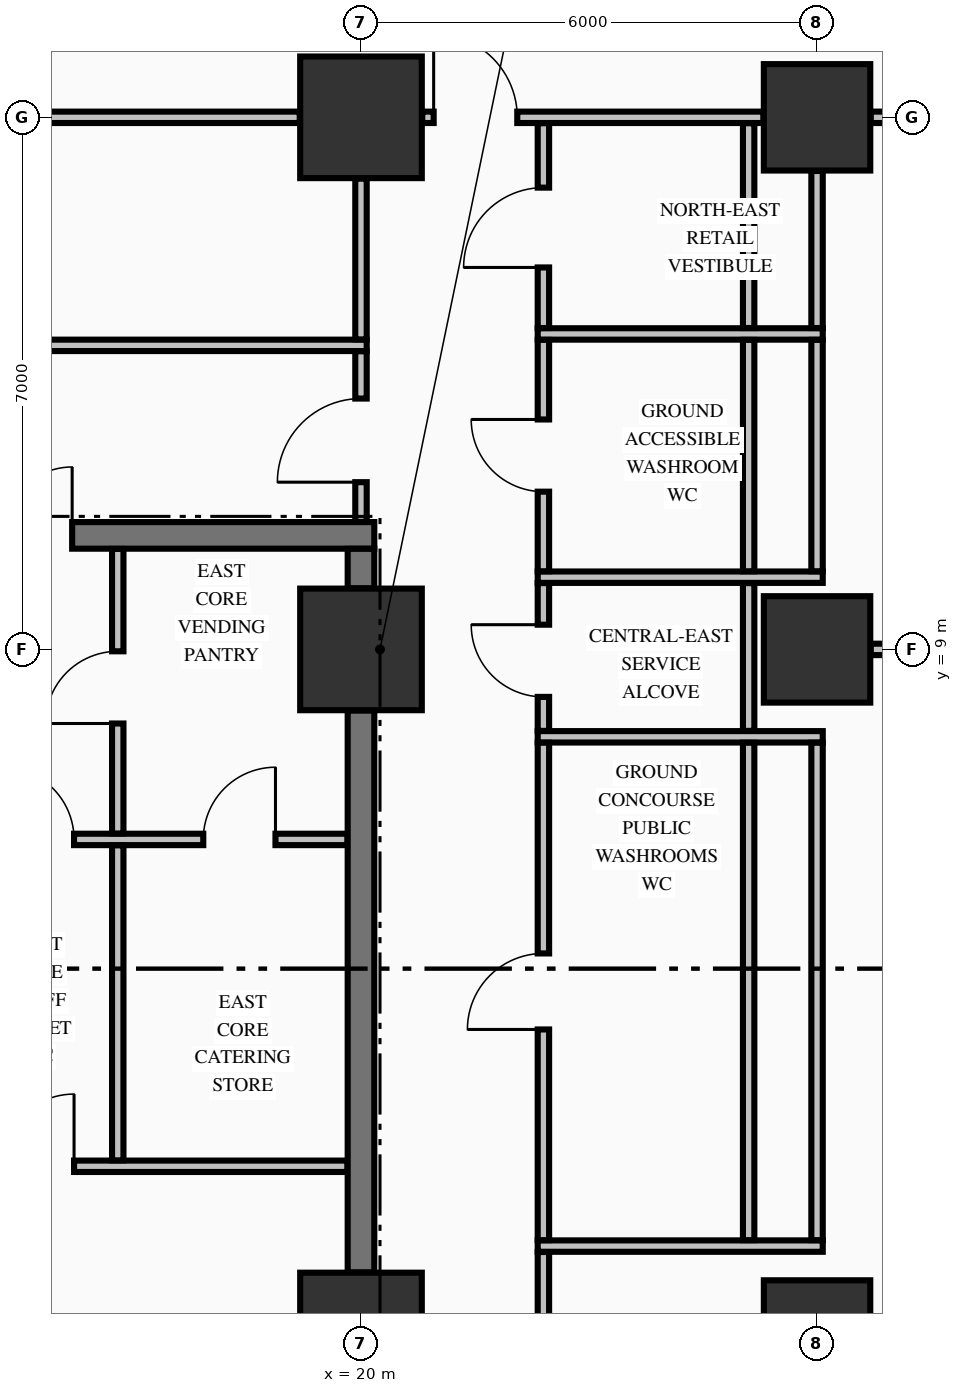
"""IFC4 building model, lengths in metres.
Left out: names, types, materials, properties, quantities, classifications, styles, units other than length and angle.
Written with IfcOpenShell. Run it as: python <this file> out.ifc"""

import sys

from ifc_helpers import new_model, si_unit, direction, frame, frame_2d, origin, origin_2d, place, context, subcontext, project, spatial, rectangle, extrude, element, fill, save


model = new_model("IFC4")
c1 = context("Model", 3, precision=1e-05, world=origin(), true_north=direction((0.0, 1.0)))
c2 = subcontext(c1, "Body", "Model", "MODEL_VIEW")
j1 = project(units=[si_unit("LENGTHUNIT", "METRE"), si_unit("PLANEANGLEUNIT", "RADIAN")], contexts=[c1])
p1 = place(None, origin())
s1 = spatial("IfcSite", under=j1, at=p1, CompositionType="ELEMENT")
p2 = place(p1, origin())
s2 = spatial("IfcBuilding", under=s1, at=p2, CompositionType="ELEMENT")
p3 = place(p2, origin())
s3 = spatial("IfcBuildingStorey", under=s2, at=p3, CompositionType="ELEMENT", Elevation=0.0)
for number, where, z_axis, x_axis in (
    (1, (20.0, 0.0, 0.0), (0.0, 0.0, 1.0), (1.0, 0.0, 0.0)),
    (2, (20.0, 9.0, 0.0), (0.0, 0.0, 1.0), (1.0, 0.0, 0.0)),
    (3, (20.0, 16.0, 0.0), (0.0, 0.0, 1.0), (1.0, 0.0, 0.0)),
):
    element("IfcColumn", number, at=place(p3, frame(where, z_axis=z_axis, x_axis=x_axis)), inside=s3, PredefinedType="COLUMN", context=c2, shape_type="SweptSolid", body=[
        extrude(rectangle(XDim=1.6, YDim=1.6, at=origin_2d()), origin(), (0.0, 0.0, 1.0), 5.09),
    ])
for number, where, z_axis, x_axis in (
    (4, (26.0, 0.0, 0.0), (0.0, 0.0, 1.0), (1.0, 0.0, 0.0)),
    (5, (26.0, 9.0, 0.0), (0.0, 0.0, 1.0), (1.0, 0.0, 0.0)),
    (6, (26.0, 16.0, 0.0), (0.0, 0.0, 1.0), (1.0, 0.0, 0.0)),
):
    element("IfcColumn", number, at=place(p3, frame(where, z_axis=z_axis, x_axis=x_axis)), inside=s3, PredefinedType="COLUMN", context=c2, shape_type="SweptSolid", body=[
        extrude(rectangle(XDim=1.4, YDim=1.4, at=origin_2d()), origin(), (0.0, 0.0, 1.0), 5.09),
    ])
p4 = place(p3, frame((14.7, 10.5, 0.0), z_axis=(0.0, 0.0, 1.0), x_axis=(1.0, 0.0, 0.0)))
e7 = element("IfcWall", 7, at=p4, inside=s3, PredefinedType="SHEAR", context=c2, shape_type="SweptSolid", body=[
    extrude(rectangle(XDim=5.475, YDim=0.35, at=frame_2d((2.738, 0.0))), origin(), (0.0, 0.0, 1.0), 5.09),
])
p5 = place(p4, frame((0.6, 0.0, 0.0)))
e8 = element("IfcOpeningElement", 8, at=p5, cuts=e7, PredefinedType="OPENING", context=c2, shape_type="SweptSolid", body=[
    extrude(rectangle(XDim=0.9, YDim=2.15, at=frame_2d((0.45, 1.075))), frame((0.0, 0.185, 0.0), z_axis=(0.0, -1.0, 0.0), x_axis=(1.0, 0.0, 0.0)), (0.0, 0.0, 1.0), 0.37),
])
p6 = place(p3, frame((22.325, 1.15, 0.0), z_axis=(0.0, 0.0, 1.0), x_axis=(1.0, 0.0, 0.0)))
e9 = element("IfcWall", 9, at=p6, inside=s3, PredefinedType="PARTITIONING", context=c2, shape_type="SweptSolid", body=[
    extrude(rectangle(XDim=3.75, YDim=0.15, at=frame_2d((1.875, 0.0))), origin(), (0.0, 0.0, 1.0), 5.09),
])
p7 = place(p3, frame((14.878, 2.2, 0.0), z_axis=(0.0, 0.0, 1.0), x_axis=(1.0, 0.0, 0.0)))
e10 = element("IfcWall", 10, at=p7, inside=s3, PredefinedType="PARTITIONING", context=c2, shape_type="SweptSolid", body=[
    extrude(rectangle(XDim=4.944, YDim=0.15, at=frame_2d((2.472, 0.0))), origin(), (0.0, 0.0, 1.0), 5.09),
])
p8 = place(p7, frame((0.397, 0.0, 0.0)))
e11 = element("IfcOpeningElement", 11, at=p8, cuts=e10, PredefinedType="OPENING", context=c2, shape_type="SweptSolid", body=[
    extrude(rectangle(XDim=0.95, YDim=2.15, at=frame_2d((0.475, 1.075))), frame((0.0, 0.085, 0.0), z_axis=(0.0, -1.0, 0.0), x_axis=(1.0, 0.0, 0.0)), (0.0, 0.0, 1.0), 0.17),
])
p9 = place(p3, frame((14.878, 6.5, 0.0), z_axis=(0.0, 0.0, 1.0), x_axis=(1.0, 0.0, 0.0)))
e12 = element("IfcWall", 12, at=p9, inside=s3, PredefinedType="PARTITIONING", context=c2, shape_type="SweptSolid", body=[
    extrude(rectangle(XDim=4.944, YDim=0.15, at=frame_2d((2.472, 0.0))), origin(), (0.0, 0.0, 1.0), 5.09),
])
p10 = place(p9, frame((0.397, 0.0, 0.0)))
e13 = element("IfcOpeningElement", 13, at=p10, cuts=e12, PredefinedType="OPENING", context=c2, shape_type="SweptSolid", body=[
    extrude(rectangle(XDim=0.95, YDim=2.15, at=frame_2d((0.475, 1.075))), frame((0.0, 0.085, 0.0), z_axis=(0.0, -1.0, 0.0), x_axis=(1.0, 0.0, 0.0)), (0.0, 0.0, 1.0), 0.17),
])
p11 = place(p9, frame((3.047, 0.0, 0.0)))
e14 = element("IfcOpeningElement", 14, at=p11, cuts=e12, PredefinedType="OPENING", context=c2, shape_type="SweptSolid", body=[
    extrude(rectangle(XDim=0.95, YDim=2.15, at=frame_2d((0.475, 1.075))), frame((0.0, 0.085, 0.0), z_axis=(0.0, -1.0, 0.0), x_axis=(1.0, 0.0, 0.0)), (0.0, 0.0, 1.0), 0.17),
])
p12 = place(p3, frame((22.325, 7.85, 0.0), z_axis=(0.0, 0.0, 1.0), x_axis=(1.0, 0.0, 0.0)))
e15 = element("IfcWall", 15, at=p12, inside=s3, PredefinedType="PARTITIONING", context=c2, shape_type="SweptSolid", body=[
    extrude(rectangle(XDim=3.75, YDim=0.15, at=frame_2d((1.875, 0.0))), origin(), (0.0, 0.0, 1.0), 5.09),
])
p13 = place(p3, frame((26.706, 9.0, 0.0), z_axis=(0.0, 0.0, 1.0), x_axis=(1.0, 0.0, 0.0)))
e16 = element("IfcWall", 16, at=p13, inside=s3, PredefinedType="PARTITIONING", context=c2, shape_type="SweptSolid", body=[
    extrude(rectangle(XDim=2.588, YDim=0.15, at=frame_2d((1.294, 0.0))), origin(), (0.0, 0.0, 1.0), 4.132),
])
p14 = place(p13, frame((0.744, 0.0, 0.0)))
e17 = element("IfcOpeningElement", 17, at=p14, cuts=e16, PredefinedType="OPENING", context=c2, shape_type="SweptSolid", body=[
    extrude(rectangle(XDim=1.1, YDim=2.15, at=frame_2d((0.55, 1.075))), frame((0.0, 0.085, 0.0), z_axis=(0.0, -1.0, 0.0), x_axis=(1.0, 0.0, 0.0)), (0.0, 0.0, 1.0), 0.17),
])
p15 = place(p3, frame((22.325, 9.95, 0.0), z_axis=(0.0, 0.0, 1.0), x_axis=(1.0, 0.0, 0.0)))
e18 = element("IfcWall", 18, at=p15, inside=s3, PredefinedType="PARTITIONING", context=c2, shape_type="SweptSolid", body=[
    extrude(rectangle(XDim=3.75, YDim=0.15, at=frame_2d((1.875, 0.0))), origin(), (0.0, 0.0, 1.0), 5.09),
])
p16 = place(p3, frame((8.765, 13.0, 0.0), z_axis=(0.0, 0.0, 1.0), x_axis=(1.0, 0.0, 0.0)))
e19 = element("IfcWall", 19, at=p16, inside=s3, PredefinedType="PARTITIONING", context=c2, shape_type="SweptSolid", body=[
    extrude(rectangle(XDim=11.31, YDim=0.15, at=frame_2d((5.655, 0.0))), origin(), (0.0, 0.0, 1.0), 5.09),
])
p17 = place(p16, frame((0.485, 0.0, 0.0)))
e20 = element("IfcOpeningElement", 20, at=p17, cuts=e19, PredefinedType="OPENING", context=c2, shape_type="SweptSolid", body=[
    extrude(rectangle(XDim=1.1, YDim=2.15, at=frame_2d((0.55, 1.075))), frame((0.0, 0.085, 0.0), z_axis=(0.0, -1.0, 0.0), x_axis=(1.0, 0.0, 0.0)), (0.0, 0.0, 1.0), 0.17),
])
p18 = place(p3, frame((22.325, 13.15, 0.0), z_axis=(0.0, 0.0, 1.0), x_axis=(1.0, 0.0, 0.0)))
e21 = element("IfcWall", 21, at=p18, inside=s3, PredefinedType="PARTITIONING", context=c2, shape_type="SweptSolid", body=[
    extrude(rectangle(XDim=3.75, YDim=0.15, at=frame_2d((1.875, 0.0))), origin(), (0.0, 0.0, 1.0), 5.09),
])
p19 = place(p3, frame((11.806, 16.0, 0.0), z_axis=(0.0, 0.0, 1.0), x_axis=(1.0, 0.0, 0.0)))
e22 = element("IfcWall", 22, at=p19, inside=s3, PredefinedType="PARTITIONING", context=c2, shape_type="SweptSolid", body=[
    extrude(rectangle(XDim=7.388, YDim=0.15, at=frame_2d((3.694, 0.0))), origin(), (0.0, 0.0, 1.0), 4.132),
])
p20 = place(p3, frame((20.806, 16.0, 0.0), z_axis=(0.0, 0.0, 1.0), x_axis=(1.0, 0.0, 0.0)))
e23 = element("IfcWall", 23, at=p20, inside=s3, PredefinedType="PARTITIONING", context=c2, shape_type="SweptSolid", body=[
    extrude(rectangle(XDim=4.488, YDim=0.15, at=frame_2d((2.244, 0.0))), origin(), (0.0, 0.0, 1.0), 4.132),
])
p21 = place(p20, frame((0.15, 0.0, 0.0)))
e24 = element("IfcOpeningElement", 24, at=p21, cuts=e23, PredefinedType="OPENING", context=c2, shape_type="SweptSolid", body=[
    extrude(rectangle(XDim=1.1, YDim=2.15, at=frame_2d((0.55, 1.075))), frame((0.0, 0.085, 0.0), z_axis=(0.0, -1.0, 0.0), x_axis=(1.0, 0.0, 0.0)), (0.0, 0.0, 1.0), 0.17),
])
p22 = place(p3, frame((26.706, 16.0, 0.0), z_axis=(0.0, 0.0, 1.0), x_axis=(1.0, 0.0, 0.0)))
e25 = element("IfcWall", 25, at=p22, inside=s3, PredefinedType="PARTITIONING", context=c2, shape_type="SweptSolid", body=[
    extrude(rectangle(XDim=2.588, YDim=0.15, at=frame_2d((1.294, 0.0))), origin(), (0.0, 0.0, 1.0), 4.132),
])
p23 = place(p22, frame((0.819, 0.0, 0.0)))
e26 = element("IfcOpeningElement", 26, at=p23, cuts=e25, PredefinedType="OPENING", context=c2, shape_type="SweptSolid", body=[
    extrude(rectangle(XDim=0.95, YDim=2.15, at=frame_2d((0.475, 1.075))), frame((0.0, 0.085, 0.0), z_axis=(0.0, -1.0, 0.0), x_axis=(1.0, 0.0, 0.0)), (0.0, 0.0, 1.0), 0.17),
])
p24 = place(p3, frame((20.0, 0.804, 0.0), z_axis=(0.0, 0.0, 1.0), x_axis=(0.0, 1.0, 0.0)))
e27 = element("IfcWall", 27, at=p24, inside=s3, PredefinedType="SHEAR", context=c2, shape_type="SweptSolid", body=[
    extrude(rectangle(XDim=7.392, YDim=0.35, at=frame_2d((3.696, 0.0))), origin(), (0.0, 0.0, 1.0), 5.09),
])
p25 = place(p3, frame((20.0, 9.804, 0.0), z_axis=(0.0, 0.0, 1.0), x_axis=(0.0, 1.0, 0.0)))
e28 = element("IfcWall", 28, at=p25, inside=s3, PredefinedType="SHEAR", context=c2, shape_type="SweptSolid", body=[
    extrude(rectangle(XDim=0.519, YDim=0.35, at=frame_2d((0.26, 0.0))), origin(), (0.0, 0.0, 1.0), 5.09),
])
p26 = place(p3, frame((16.8, 2.278, 0.0), z_axis=(0.0, 0.0, 1.0), x_axis=(0.0, 1.0, 0.0)))
e29 = element("IfcWall", 29, at=p26, inside=s3, PredefinedType="PARTITIONING", context=c2, shape_type="SweptSolid", body=[
    extrude(rectangle(XDim=4.144, YDim=0.15, at=frame_2d((2.072, 0.0))), origin(), (0.0, 0.0, 1.0), 5.09),
])
p27 = place(p3, frame((16.8, 6.578, 0.0), z_axis=(0.0, 0.0, 1.0), x_axis=(0.0, 1.0, 0.0)))
e30 = element("IfcWall", 30, at=p27, inside=s3, PredefinedType="PARTITIONING", context=c2, shape_type="SweptSolid", body=[
    extrude(rectangle(XDim=3.744, YDim=0.15, at=frame_2d((1.872, 0.0))), origin(), (0.0, 0.0, 1.0), 5.09),
])
p28 = place(p27, frame((1.447, 0.0, 0.0)))
e31 = element("IfcOpeningElement", 31, at=p28, cuts=e30, PredefinedType="OPENING", context=c2, shape_type="SweptSolid", body=[
    extrude(rectangle(XDim=0.95, YDim=2.15, at=frame_2d((0.475, 1.075))), frame((0.0, 0.085, 0.0), z_axis=(0.0, -1.0, 0.0), x_axis=(1.0, 0.0, 0.0)), (0.0, 0.0, 1.0), 0.17),
])
p29 = place(p3, frame((20.0, 10.678, 0.0), z_axis=(0.0, 0.0, 1.0), x_axis=(0.0, 1.0, 0.0)))
e32 = element("IfcWall", 32, at=p29, inside=s3, PredefinedType="PARTITIONING", context=c2, shape_type="SweptSolid", body=[
    extrude(rectangle(XDim=2.244, YDim=0.15, at=frame_2d((1.122, 0.0))), origin(), (0.0, 0.0, 1.0), 4.132),
])
p30 = place(p29, frame((0.522, 0.0, 0.0)))
e33 = element("IfcOpeningElement", 33, at=p30, cuts=e32, PredefinedType="OPENING", context=c2, shape_type="SweptSolid", body=[
    extrude(rectangle(XDim=1.1, YDim=2.15, at=frame_2d((0.55, 1.075))), frame((0.0, 0.085, 0.0), z_axis=(0.0, -1.0, 0.0), x_axis=(1.0, 0.0, 0.0)), (0.0, 0.0, 1.0), 0.17),
])
p31 = place(p3, frame((20.0, 13.078, 0.0), z_axis=(0.0, 0.0, 1.0), x_axis=(0.0, 1.0, 0.0)))
e34 = element("IfcWall", 34, at=p31, inside=s3, PredefinedType="PARTITIONING", context=c2, shape_type="SweptSolid", body=[
    extrude(rectangle(XDim=2.116, YDim=0.15, at=frame_2d((1.058, 0.0))), origin(), (0.0, 0.0, 1.0), 4.132),
])
p32 = place(p3, frame((22.4, -16.122, 0.0), z_axis=(0.0, 0.0, 1.0), x_axis=(0.0, 1.0, 0.0)))
e35 = element("IfcWall", 35, at=p32, inside=s3, PredefinedType="PARTITIONING", context=c2, shape_type="SweptSolid", body=[
    extrude(rectangle(XDim=17.194, YDim=0.15, at=frame_2d((8.597, 0.0))), origin(), (0.0, 0.0, 1.0), 5.09),
])
p33 = place(p32, frame((10.522, 0.0, 0.0)))
e36 = element("IfcOpeningElement", 36, at=p33, cuts=e35, PredefinedType="OPENING", context=c2, shape_type="SweptSolid", body=[
    extrude(rectangle(XDim=1.2, YDim=2.15, at=frame_2d((0.6, 1.075))), frame((0.0, 0.085, 0.0), z_axis=(0.0, -1.0, 0.0), x_axis=(1.0, 0.0, 0.0)), (0.0, 0.0, 1.0), 0.17),
])
p34 = place(p3, frame((22.4, 1.228, 0.0), z_axis=(0.0, 0.0, 1.0), x_axis=(0.0, 1.0, 0.0)))
e37 = element("IfcWall", 37, at=p34, inside=s3, PredefinedType="PARTITIONING", context=c2, shape_type="SweptSolid", body=[
    extrude(rectangle(XDim=6.544, YDim=0.15, at=frame_2d((3.272, 0.0))), origin(), (0.0, 0.0, 1.0), 5.09),
])
p35 = place(p34, frame((2.772, 0.0, 0.0)))
e38 = element("IfcOpeningElement", 38, at=p35, cuts=e37, PredefinedType="OPENING", context=c2, shape_type="SweptSolid", body=[
    extrude(rectangle(XDim=1.0, YDim=2.15, at=frame_2d((0.5, 1.075))), frame((0.0, 0.085, 0.0), z_axis=(0.0, -1.0, 0.0), x_axis=(1.0, 0.0, 0.0)), (0.0, 0.0, 1.0), 0.17),
])
p36 = place(p3, frame((22.4, 7.928, 0.0), z_axis=(0.0, 0.0, 1.0), x_axis=(0.0, 1.0, 0.0)))
e39 = element("IfcWall", 39, at=p36, inside=s3, PredefinedType="PARTITIONING", context=c2, shape_type="SweptSolid", body=[
    extrude(rectangle(XDim=1.944, YDim=0.15, at=frame_2d((0.972, 0.0))), origin(), (0.0, 0.0, 1.0), 5.09),
])
p37 = place(p36, frame((0.447, 0.0, 0.0)))
e40 = element("IfcOpeningElement", 40, at=p37, cuts=e39, PredefinedType="OPENING", context=c2, shape_type="SweptSolid", body=[
    extrude(rectangle(XDim=0.95, YDim=2.15, at=frame_2d((0.475, 1.075))), frame((0.0, 0.085, 0.0), z_axis=(0.0, -1.0, 0.0), x_axis=(1.0, 0.0, 0.0)), (0.0, 0.0, 1.0), 0.17),
])
p38 = place(p3, frame((22.4, 10.028, 0.0), z_axis=(0.0, 0.0, 1.0), x_axis=(0.0, 1.0, 0.0)))
e41 = element("IfcWall", 41, at=p38, inside=s3, PredefinedType="PARTITIONING", context=c2, shape_type="SweptSolid", body=[
    extrude(rectangle(XDim=3.044, YDim=0.15, at=frame_2d((1.522, 0.0))), origin(), (0.0, 0.0, 1.0), 5.09),
])
p39 = place(p38, frame((1.047, 0.0, 0.0)))
e42 = element("IfcOpeningElement", 42, at=p39, cuts=e41, PredefinedType="OPENING", context=c2, shape_type="SweptSolid", body=[
    extrude(rectangle(XDim=0.95, YDim=2.15, at=frame_2d((0.475, 1.075))), frame((0.0, 0.085, 0.0), z_axis=(0.0, -1.0, 0.0), x_axis=(1.0, 0.0, 0.0)), (0.0, 0.0, 1.0), 0.17),
])
p40 = place(p3, frame((22.4, 13.228, 0.0), z_axis=(0.0, 0.0, 1.0), x_axis=(0.0, 1.0, 0.0)))
e43 = element("IfcWall", 43, at=p40, inside=s3, PredefinedType="PARTITIONING", context=c2, shape_type="SweptSolid", body=[
    extrude(rectangle(XDim=2.694, YDim=0.15, at=frame_2d((1.347, 0.0))), origin(), (0.0, 0.0, 1.0), 5.09),
])
p41 = place(p40, frame((0.797, 0.0, 0.0)))
e44 = element("IfcOpeningElement", 44, at=p41, cuts=e43, PredefinedType="OPENING", context=c2, shape_type="SweptSolid", body=[
    extrude(rectangle(XDim=1.05, YDim=2.15, at=frame_2d((0.525, 1.075))), frame((0.0, 0.085, 0.0), z_axis=(0.0, -1.0, 0.0), x_axis=(1.0, 0.0, 0.0)), (0.0, 0.0, 1.0), 0.17),
])
p42 = place(p3, frame((25.1, 1.228, 0.0), z_axis=(0.0, 0.0, 1.0), x_axis=(0.0, 1.0, 0.0)))
e45 = element("IfcWall", 45, at=p42, inside=s3, PredefinedType="PARTITIONING", context=c2, shape_type="SweptSolid", body=[
    extrude(rectangle(XDim=6.544, YDim=0.15, at=frame_2d((3.272, 0.0))), origin(), (0.0, 0.0, 1.0), 5.09),
])
p43 = place(p3, frame((25.1, 7.928, 0.0), z_axis=(0.0, 0.0, 1.0), x_axis=(0.0, 1.0, 0.0)))
e46 = element("IfcWall", 46, at=p43, inside=s3, PredefinedType="PARTITIONING", context=c2, shape_type="SweptSolid", body=[
    extrude(rectangle(XDim=1.944, YDim=0.15, at=frame_2d((0.972, 0.0))), origin(), (0.0, 0.0, 1.0), 5.09),
])
p44 = place(p3, frame((25.1, 10.028, 0.0), z_axis=(0.0, 0.0, 1.0), x_axis=(0.0, 1.0, 0.0)))
e47 = element("IfcWall", 47, at=p44, inside=s3, PredefinedType="PARTITIONING", context=c2, shape_type="SweptSolid", body=[
    extrude(rectangle(XDim=3.044, YDim=0.15, at=frame_2d((1.522, 0.0))), origin(), (0.0, 0.0, 1.0), 5.09),
])
p45 = place(p3, frame((25.1, 13.228, 0.0), z_axis=(0.0, 0.0, 1.0), x_axis=(0.0, 1.0, 0.0)))
e48 = element("IfcWall", 48, at=p45, inside=s3, PredefinedType="PARTITIONING", context=c2, shape_type="SweptSolid", body=[
    extrude(rectangle(XDim=2.694, YDim=0.15, at=frame_2d((1.347, 0.0))), origin(), (0.0, 0.0, 1.0), 5.09),
])
p46 = place(p3, frame((26.0, 1.228, 0.0), z_axis=(0.0, 0.0, 1.0), x_axis=(0.0, 1.0, 0.0)))
e49 = element("IfcWall", 49, at=p46, inside=s3, PredefinedType="PARTITIONING", context=c2, shape_type="SweptSolid", body=[
    extrude(rectangle(XDim=6.544, YDim=0.15, at=frame_2d((3.272, 0.0))), origin(), (0.0, 0.0, 1.0), 4.132),
])
p47 = place(p3, frame((26.0, 10.028, 0.0), z_axis=(0.0, 0.0, 1.0), x_axis=(0.0, 1.0, 0.0)))
e50 = element("IfcWall", 50, at=p47, inside=s3, PredefinedType="PARTITIONING", context=c2, shape_type="SweptSolid", body=[
    extrude(rectangle(XDim=3.044, YDim=0.15, at=frame_2d((1.522, 0.0))), origin(), (0.0, 0.0, 1.0), 4.132),
])
p48 = place(p3, frame((26.0, 13.228, 0.0), z_axis=(0.0, 0.0, 1.0), x_axis=(0.0, 1.0, 0.0)))
e51 = element("IfcWall", 51, at=p48, inside=s3, PredefinedType="PARTITIONING", context=c2, shape_type="SweptSolid", body=[
    extrude(rectangle(XDim=2.066, YDim=0.15, at=frame_2d((1.033, 0.0))), origin(), (0.0, 0.0, 1.0), 4.132),
])
p49 = place(p5, origin())
e52 = element("IfcDoor", 52, at=p49, inside=s3, OperationType="SINGLE_SWING_RIGHT", PredefinedType="DOOR", context=c2, shape_type="SweptSolid", body=[
    extrude(rectangle(XDim=0.9, YDim=2.15, at=frame_2d((0.45, 1.075))), frame((0.0, 0.025, 0.0), z_axis=(0.0, -1.0, 0.0), x_axis=(1.0, 0.0, 0.0)), (0.0, 0.0, 1.0), 0.05),
])
fill(e8, e52)
p50 = place(p10, origin())
e53 = element("IfcDoor", 53, at=p50, inside=s3, OperationType="SINGLE_SWING_LEFT", PredefinedType="DOOR", context=c2, shape_type="SweptSolid", body=[
    extrude(rectangle(XDim=0.95, YDim=2.15, at=frame_2d((0.475, 1.075))), frame((0.0, 0.025, 0.0), z_axis=(0.0, -1.0, 0.0), x_axis=(1.0, 0.0, 0.0)), (0.0, 0.0, 1.0), 0.05),
])
fill(e13, e53)
p51 = place(p8, origin())
e54 = element("IfcDoor", 54, at=p51, inside=s3, OperationType="SINGLE_SWING_RIGHT", PredefinedType="DOOR", context=c2, shape_type="SweptSolid", body=[
    extrude(rectangle(XDim=0.95, YDim=2.15, at=frame_2d((0.475, 1.075))), frame((0.0, 0.025, 0.0), z_axis=(0.0, -1.0, 0.0), x_axis=(1.0, 0.0, 0.0)), (0.0, 0.0, 1.0), 0.05),
])
fill(e11, e54)
p52 = place(p28, origin())
e55 = element("IfcDoor", 55, at=p52, inside=s3, OperationType="SINGLE_SWING_LEFT", PredefinedType="DOOR", context=c2, shape_type="SweptSolid", body=[
    extrude(rectangle(XDim=0.95, YDim=2.15, at=frame_2d((0.475, 1.075))), frame((0.0, 0.025, 0.0), z_axis=(0.0, -1.0, 0.0), x_axis=(1.0, 0.0, 0.0)), (0.0, 0.0, 1.0), 0.05),
])
fill(e31, e55)
p53 = place(p11, origin())
e56 = element("IfcDoor", 56, at=p53, inside=s3, OperationType="SINGLE_SWING_RIGHT", PredefinedType="DOOR", context=c2, shape_type="SweptSolid", body=[
    extrude(rectangle(XDim=0.95, YDim=2.15, at=frame_2d((0.475, 1.075))), frame((0.0, 0.025, 0.0), z_axis=(0.0, -1.0, 0.0), x_axis=(1.0, 0.0, 0.0)), (0.0, 0.0, 1.0), 0.05),
])
fill(e14, e56)
p54 = place(p21, origin())
e57 = element("IfcDoor", 57, at=p54, inside=s3, OperationType="SINGLE_SWING_LEFT", PredefinedType="DOOR", context=c2, shape_type="SweptSolid", body=[
    extrude(rectangle(XDim=1.1, YDim=2.15, at=frame_2d((0.55, 1.075))), frame((0.0, 0.025, 0.0), z_axis=(0.0, -1.0, 0.0), x_axis=(1.0, 0.0, 0.0)), (0.0, 0.0, 1.0), 0.05),
])
fill(e24, e57)
p55 = place(p30, origin())
e58 = element("IfcDoor", 58, at=p55, inside=s3, OperationType="SINGLE_SWING_LEFT", PredefinedType="DOOR", context=c2, shape_type="SweptSolid", body=[
    extrude(rectangle(XDim=1.1, YDim=2.15, at=frame_2d((0.55, 1.075))), frame((0.0, 0.025, 0.0), z_axis=(0.0, -1.0, 0.0), x_axis=(1.0, 0.0, 0.0)), (0.0, 0.0, 1.0), 0.05),
])
fill(e33, e58)
p56 = place(p35, origin())
e59 = element("IfcDoor", 59, at=p56, inside=s3, OperationType="SINGLE_SWING_LEFT", PredefinedType="DOOR", context=c2, shape_type="SweptSolid", body=[
    extrude(rectangle(XDim=1.0, YDim=2.15, at=frame_2d((0.5, 1.075))), frame((0.0, 0.025, 0.0), z_axis=(0.0, -1.0, 0.0), x_axis=(1.0, 0.0, 0.0)), (0.0, 0.0, 1.0), 0.05),
])
fill(e38, e59)
p57 = place(p39, origin())
e60 = element("IfcDoor", 60, at=p57, inside=s3, OperationType="SINGLE_SWING_RIGHT", PredefinedType="DOOR", context=c2, shape_type="SweptSolid", body=[
    extrude(rectangle(XDim=0.95, YDim=2.15, at=frame_2d((0.475, 1.075))), frame((0.0, 0.025, 0.0), z_axis=(0.0, -1.0, 0.0), x_axis=(1.0, 0.0, 0.0)), (0.0, 0.0, 1.0), 0.05),
])
fill(e42, e60)
p58 = place(p41, origin())
e61 = element("IfcDoor", 61, at=p58, inside=s3, OperationType="SINGLE_SWING_LEFT", PredefinedType="DOOR", context=c2, shape_type="SweptSolid", body=[
    extrude(rectangle(XDim=1.05, YDim=2.15, at=frame_2d((0.525, 1.075))), frame((0.0, 0.025, 0.0), z_axis=(0.0, -1.0, 0.0), x_axis=(1.0, 0.0, 0.0)), (0.0, 0.0, 1.0), 0.05),
])
fill(e44, e61)
p59 = place(p37, origin())
e62 = element("IfcDoor", 62, at=p59, inside=s3, OperationType="SINGLE_SWING_RIGHT", PredefinedType="DOOR", context=c2, shape_type="SweptSolid", body=[
    extrude(rectangle(XDim=0.95, YDim=2.15, at=frame_2d((0.475, 1.075))), frame((0.0, 0.025, 0.0), z_axis=(0.0, -1.0, 0.0), x_axis=(1.0, 0.0, 0.0)), (0.0, 0.0, 1.0), 0.05),
])
fill(e40, e62)
save(model, sys.argv[1])
